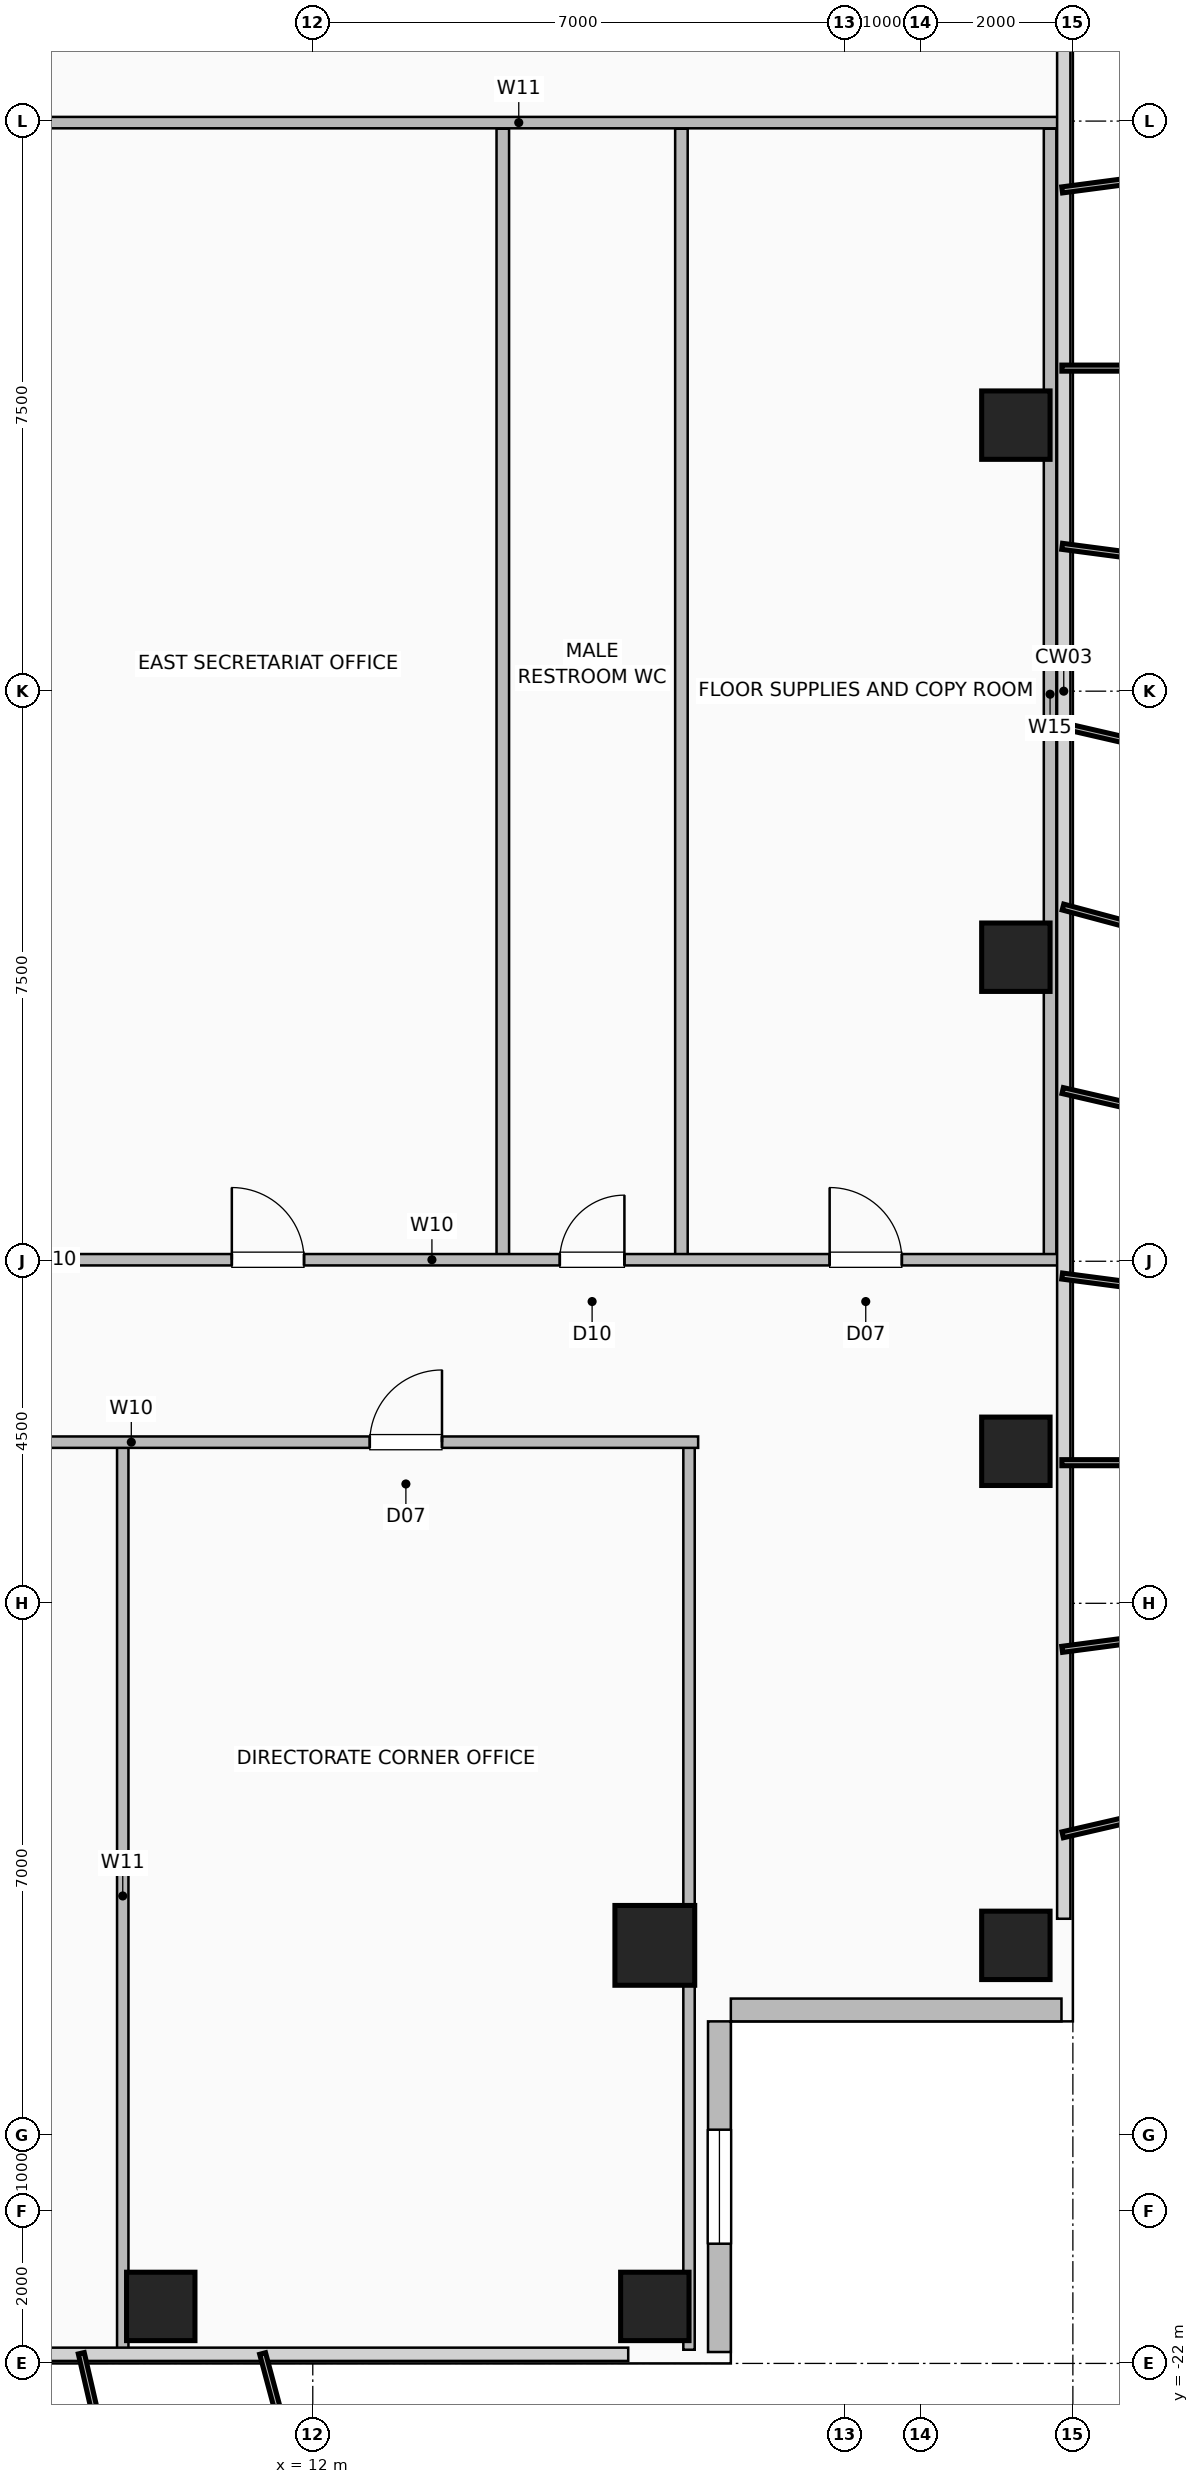
"""IFC4 building model, lengths in metres.
Left out: names, types, materials, properties, quantities, classifications, styles, units other than length and angle.
Written with IfcOpenShell. Run it as: python <this file> out.ifc"""

import sys

from ifc_helpers import new_model, si_unit, direction, frame, frame_2d, origin, origin_2d, place, context, subcontext, project, spatial, rectangle, hollow_rectangle, extrude, element, fill, save


model = new_model("IFC4")
c1 = context("Model", 3, precision=1e-05, world=origin(), true_north=direction((0.0, 1.0)))
c2 = subcontext(c1, "Body", "Model", "MODEL_VIEW")
j1 = project(units=[si_unit("LENGTHUNIT", "METRE"), si_unit("PLANEANGLEUNIT", "RADIAN")], contexts=[c1])
p1 = place(None, origin())
s1 = spatial("IfcSite", under=j1, at=p1, CompositionType="ELEMENT")
p2 = place(p1, origin())
s2 = spatial("IfcBuilding", under=s1, at=p2, CompositionType="ELEMENT")
p3 = place(p2, frame((0.0, 0.0, 115.6)))
s3 = spatial("IfcBuildingStorey", under=s2, at=p3, CompositionType="ELEMENT", Elevation=115.6)
for number, where, z_axis, x_axis in (
    (1, (21.25, -16.5, 0.0), (0.0, 0.0, 1.0), (1.0, 0.0, 0.0)),
    (2, (21.25, -10.0, 0.0), (0.0, 0.0, 1.0), (1.0, 0.0, 0.0)),
    (3, (21.25, -3.5, 0.0), (0.0, 0.0, 1.0), (1.0, 0.0, 0.0)),
    (4, (21.25, 3.5, 0.0), (0.0, 0.0, 1.0), (1.0, 0.0, 0.0)),
    (5, (10.0, -21.25, 0.0), (0.0, 0.0, 1.0), (1.0, 0.0, 0.0)),
    (6, (16.5, -21.25, 0.0), (0.0, 0.0, 1.0), (1.0, 0.0, 0.0)),
):
    element("IfcColumn", number, at=place(p3, frame(where, z_axis=z_axis, x_axis=x_axis)), inside=s3, PredefinedType="COLUMN", context=c2, shape_type="SweptSolid", body=[
        extrude(hollow_rectangle(XDim=0.9, YDim=0.9, WallThickness=0.045, at=origin_2d()), origin(), (0.0, 0.0, 1.0), 3.6),
    ])
p4 = place(p3, frame((16.5, -16.5, 0.0), z_axis=(0.0, 0.0, 1.0), x_axis=(1.0, 0.0, 0.0)))
e7 = element("IfcColumn", 7, at=p4, inside=s3, PredefinedType="COLUMN", context=c2, shape_type="SweptSolid", body=[
    extrude(hollow_rectangle(XDim=1.05, YDim=1.05, WallThickness=0.05, at=origin_2d()), origin(), (0.0, 0.0, 1.0), 3.6),
])
p5 = place(p3, frame((17.35, -21.85, 0.0), z_axis=(0.0, 0.0, 1.0), x_axis=(0.0, 1.0, 0.0)))
e8 = element("IfcWall", 8, at=p5, inside=s3, PredefinedType="SOLIDWALL", context=c2, shape_type="SweptSolid", body=[
    extrude(rectangle(XDim=4.35, YDim=0.3, at=frame_2d((2.175, 0.0))), origin(), (0.0, 0.0, 1.0), 3.36),
])
p6 = place(p5, frame((1.425, 0.0, 0.9)))
e9 = element("IfcOpeningElement", 9, at=p6, cuts=e8, PredefinedType="OPENING", context=c2, shape_type="SweptSolid", body=[
    extrude(rectangle(XDim=1.5, YDim=1.8, at=frame_2d((0.75, 0.9))), frame((0.0, 0.16, 0.0), z_axis=(0.0, -1.0, 0.0), x_axis=(1.0, 0.0, 0.0)), (0.0, 0.0, 1.0), 0.32),
])
p7 = place(p3, frame((21.85, -17.35, 0.0), z_axis=(0.0, 0.0, 1.0), x_axis=(-1.0, 0.0, 0.0)))
e10 = element("IfcWall", 10, at=p7, inside=s3, PredefinedType="SOLIDWALL", context=c2, shape_type="SweptSolid", body=[
    extrude(rectangle(XDim=4.35, YDim=0.3, at=frame_2d((2.175, 0.0))), origin(), (0.0, 0.0, 1.0), 3.36),
])
for number, where, z_axis, x_axis in (
    (11, (9.5, -21.82, 0.0), (0.0, 0.0, 1.0), (0.0, 1.0, 0.0)),
    (12, (16.95, -21.82, 0.0), (0.0, 0.0, 1.0), (0.0, 1.0, 0.0)),
):
    element("IfcWall", number, at=place(p3, frame(where, z_axis=z_axis, x_axis=x_axis)), inside=s3, PredefinedType="PARTITIONING", context=c2, shape_type="SweptSolid", body=[
        extrude(rectangle(XDim=11.94, YDim=0.15, at=frame_2d((5.97, 0.0))), origin(), (0.0, 0.0, 1.0), 3.36),
    ])
p8 = place(p3, frame((-17.07, -9.88, 0.0), z_axis=(0.0, 0.0, 1.0), x_axis=(1.0, 0.0, 0.0)))
e13 = element("IfcWall", 13, at=p8, inside=s3, PredefinedType="PARTITIONING", context=c2, shape_type="SweptSolid", body=[
    extrude(rectangle(XDim=34.14, YDim=0.15, at=frame_2d((17.07, 0.0))), origin(), (0.0, 0.0, 1.0), 3.36),
])
p9 = place(p8, frame((2.87, 0.0, 0.0)))
e14 = element("IfcOpeningElement", 14, at=p9, cuts=e13, PredefinedType="OPENING", context=c2, shape_type="SweptSolid", body=[
    extrude(rectangle(XDim=0.95, YDim=2.06, at=frame_2d((0.475, 1.03))), frame((0.0, 0.085, 0.0), z_axis=(0.0, -1.0, 0.0), x_axis=(1.0, 0.0, 0.0)), (0.0, 0.0, 1.0), 0.17),
])
p10 = place(p8, frame((9.345, 0.0, 0.0)))
e15 = element("IfcOpeningElement", 15, at=p10, cuts=e13, PredefinedType="OPENING", context=c2, shape_type="SweptSolid", body=[
    extrude(rectangle(XDim=0.95, YDim=2.06, at=frame_2d((0.475, 1.03))), frame((0.0, 0.085, 0.0), z_axis=(0.0, -1.0, 0.0), x_axis=(1.0, 0.0, 0.0)), (0.0, 0.0, 1.0), 0.17),
])
p11 = place(p8, frame((15.845, 0.0, 0.0)))
e16 = element("IfcOpeningElement", 16, at=p11, cuts=e13, PredefinedType="OPENING", context=c2, shape_type="SweptSolid", body=[
    extrude(rectangle(XDim=0.95, YDim=2.06, at=frame_2d((0.475, 1.03))), frame((0.0, 0.085, 0.0), z_axis=(0.0, -1.0, 0.0), x_axis=(1.0, 0.0, 0.0)), (0.0, 0.0, 1.0), 0.17),
])
p12 = place(p8, frame((22.595, 0.0, 0.0)))
e17 = element("IfcOpeningElement", 17, at=p12, cuts=e13, PredefinedType="OPENING", context=c2, shape_type="SweptSolid", body=[
    extrude(rectangle(XDim=0.95, YDim=2.06, at=frame_2d((0.475, 1.03))), frame((0.0, 0.085, 0.0), z_axis=(0.0, -1.0, 0.0), x_axis=(1.0, 0.0, 0.0)), (0.0, 0.0, 1.0), 0.17),
])
p13 = place(p8, frame((29.82, 0.0, 0.0)))
e18 = element("IfcOpeningElement", 18, at=p13, cuts=e13, PredefinedType="OPENING", context=c2, shape_type="SweptSolid", body=[
    extrude(rectangle(XDim=0.95, YDim=2.06, at=frame_2d((0.475, 1.03))), frame((0.0, 0.085, 0.0), z_axis=(0.0, -1.0, 0.0), x_axis=(1.0, 0.0, 0.0)), (0.0, 0.0, 1.0), 0.17),
])
for number, where, z_axis, x_axis in (
    (19, (16.85, -7.48, 0.0), (0.0, 0.0, 1.0), (0.0, 1.0, 0.0)),
    (20, (14.5, -7.48, 0.0), (0.0, 0.0, 1.0), (0.0, 1.0, 0.0)),
    (21, (21.7, -7.48, 0.0), (0.0, 0.0, 1.0), (0.0, 1.0, 0.0)),
):
    element("IfcWall", number, at=place(p3, frame(where, z_axis=z_axis, x_axis=x_axis)), inside=s3, PredefinedType="PLUMBINGWALL", context=c2, shape_type="SweptSolid", body=[
        extrude(rectangle(XDim=14.88, YDim=0.165, at=frame_2d((7.44, 0.0))), origin(), (0.0, 0.0, 1.0), 3.36),
    ])
p14 = place(p3, frame((8.28, -7.48, 0.0), z_axis=(0.0, 0.0, 1.0), x_axis=(1.0, 0.0, 0.0)))
e22 = element("IfcWall", 22, at=p14, inside=s3, PredefinedType="PARTITIONING", context=c2, shape_type="SweptSolid", body=[
    extrude(rectangle(XDim=13.54, YDim=0.15, at=frame_2d((6.77, 0.0))), origin(), (0.0, 0.0, 1.0), 3.36),
])
p15 = place(p14, frame((2.655, 0.0, 0.0)))
e23 = element("IfcOpeningElement", 23, at=p15, cuts=e22, PredefinedType="OPENING", context=c2, shape_type="SweptSolid", body=[
    extrude(rectangle(XDim=0.95, YDim=2.06, at=frame_2d((0.475, 1.03))), frame((0.0, 0.085, 0.0), z_axis=(0.0, -1.0, 0.0), x_axis=(1.0, 0.0, 0.0)), (0.0, 0.0, 1.0), 0.17),
])
p16 = place(p14, frame((6.97, 0.0, 0.0)))
e24 = element("IfcOpeningElement", 24, at=p16, cuts=e22, PredefinedType="OPENING", context=c2, shape_type="SweptSolid", body=[
    extrude(rectangle(XDim=0.85, YDim=2.05, at=frame_2d((0.425, 1.025))), frame((0.0, 0.085, 0.0), z_axis=(0.0, -1.0, 0.0), x_axis=(1.0, 0.0, 0.0)), (0.0, 0.0, 1.0), 0.17),
])
p17 = place(p14, frame((10.52, 0.0, 0.0)))
e25 = element("IfcOpeningElement", 25, at=p17, cuts=e22, PredefinedType="OPENING", context=c2, shape_type="SweptSolid", body=[
    extrude(rectangle(XDim=0.95, YDim=2.06, at=frame_2d((0.475, 1.03))), frame((0.0, 0.085, 0.0), z_axis=(0.0, -1.0, 0.0), x_axis=(1.0, 0.0, 0.0)), (0.0, 0.0, 1.0), 0.17),
])
p18 = place(p3, frame((7.6, 7.48, 0.0), z_axis=(0.0, 0.0, 1.0), x_axis=(1.0, 0.0, 0.0)))
e26 = element("IfcWall", 26, at=p18, inside=s3, PredefinedType="PARTITIONING", context=c2, shape_type="SweptSolid", body=[
    extrude(rectangle(XDim=14.22, YDim=0.15, at=frame_2d((7.11, 0.0))), origin(), (0.0, 0.0, 1.0), 3.36),
])
p19 = place(p6, origin())
e27 = element("IfcWindow", 27, at=p19, inside=s3, PartitioningType="SINGLE_PANEL", PredefinedType="WINDOW", context=c2, shape_type="SweptSolid", body=[
    extrude(rectangle(XDim=1.5, YDim=1.8, at=frame_2d((0.75, 0.9))), frame((0.0, 0.03, 0.0), z_axis=(0.0, -1.0, 0.0), x_axis=(1.0, 0.0, 0.0)), (0.0, 0.0, 1.0), 0.06),
])
fill(e9, e27)
p20 = place(p13, origin())
e28 = element("IfcDoor", 28, at=p20, inside=s3, OperationType="SINGLE_SWING_RIGHT", PredefinedType="DOOR", context=c2, shape_type="SweptSolid", body=[
    extrude(rectangle(XDim=0.95, YDim=2.06, at=frame_2d((0.475, 1.03))), frame((0.0, 0.025, 0.0), z_axis=(0.0, -1.0, 0.0), x_axis=(1.0, 0.0, 0.0)), (0.0, 0.0, 1.0), 0.05),
])
fill(e18, e28)
p21 = place(p15, origin())
e29 = element("IfcDoor", 29, at=p21, inside=s3, OperationType="SINGLE_SWING_LEFT", PredefinedType="DOOR", context=c2, shape_type="SweptSolid", body=[
    extrude(rectangle(XDim=0.95, YDim=2.06, at=frame_2d((0.475, 1.03))), frame((0.0, 0.025, 0.0), z_axis=(0.0, -1.0, 0.0), x_axis=(1.0, 0.0, 0.0)), (0.0, 0.0, 1.0), 0.05),
])
fill(e23, e29)
p22 = place(p16, origin())
e30 = element("IfcDoor", 30, at=p22, inside=s3, OperationType="SINGLE_SWING_RIGHT", PredefinedType="DOOR", context=c2, shape_type="SweptSolid", body=[
    extrude(rectangle(XDim=0.85, YDim=2.05, at=frame_2d((0.425, 1.025))), frame((0.0, 0.025, 0.0), z_axis=(0.0, -1.0, 0.0), x_axis=(1.0, 0.0, 0.0)), (0.0, 0.0, 1.0), 0.05),
])
fill(e24, e30)
p23 = place(p17, origin())
e31 = element("IfcDoor", 31, at=p23, inside=s3, OperationType="SINGLE_SWING_LEFT", PredefinedType="DOOR", context=c2, shape_type="SweptSolid", body=[
    extrude(rectangle(XDim=0.95, YDim=2.06, at=frame_2d((0.475, 1.03))), frame((0.0, 0.025, 0.0), z_axis=(0.0, -1.0, 0.0), x_axis=(1.0, 0.0, 0.0)), (0.0, 0.0, 1.0), 0.05),
])
fill(e25, e31)
save(model, sys.argv[1])
